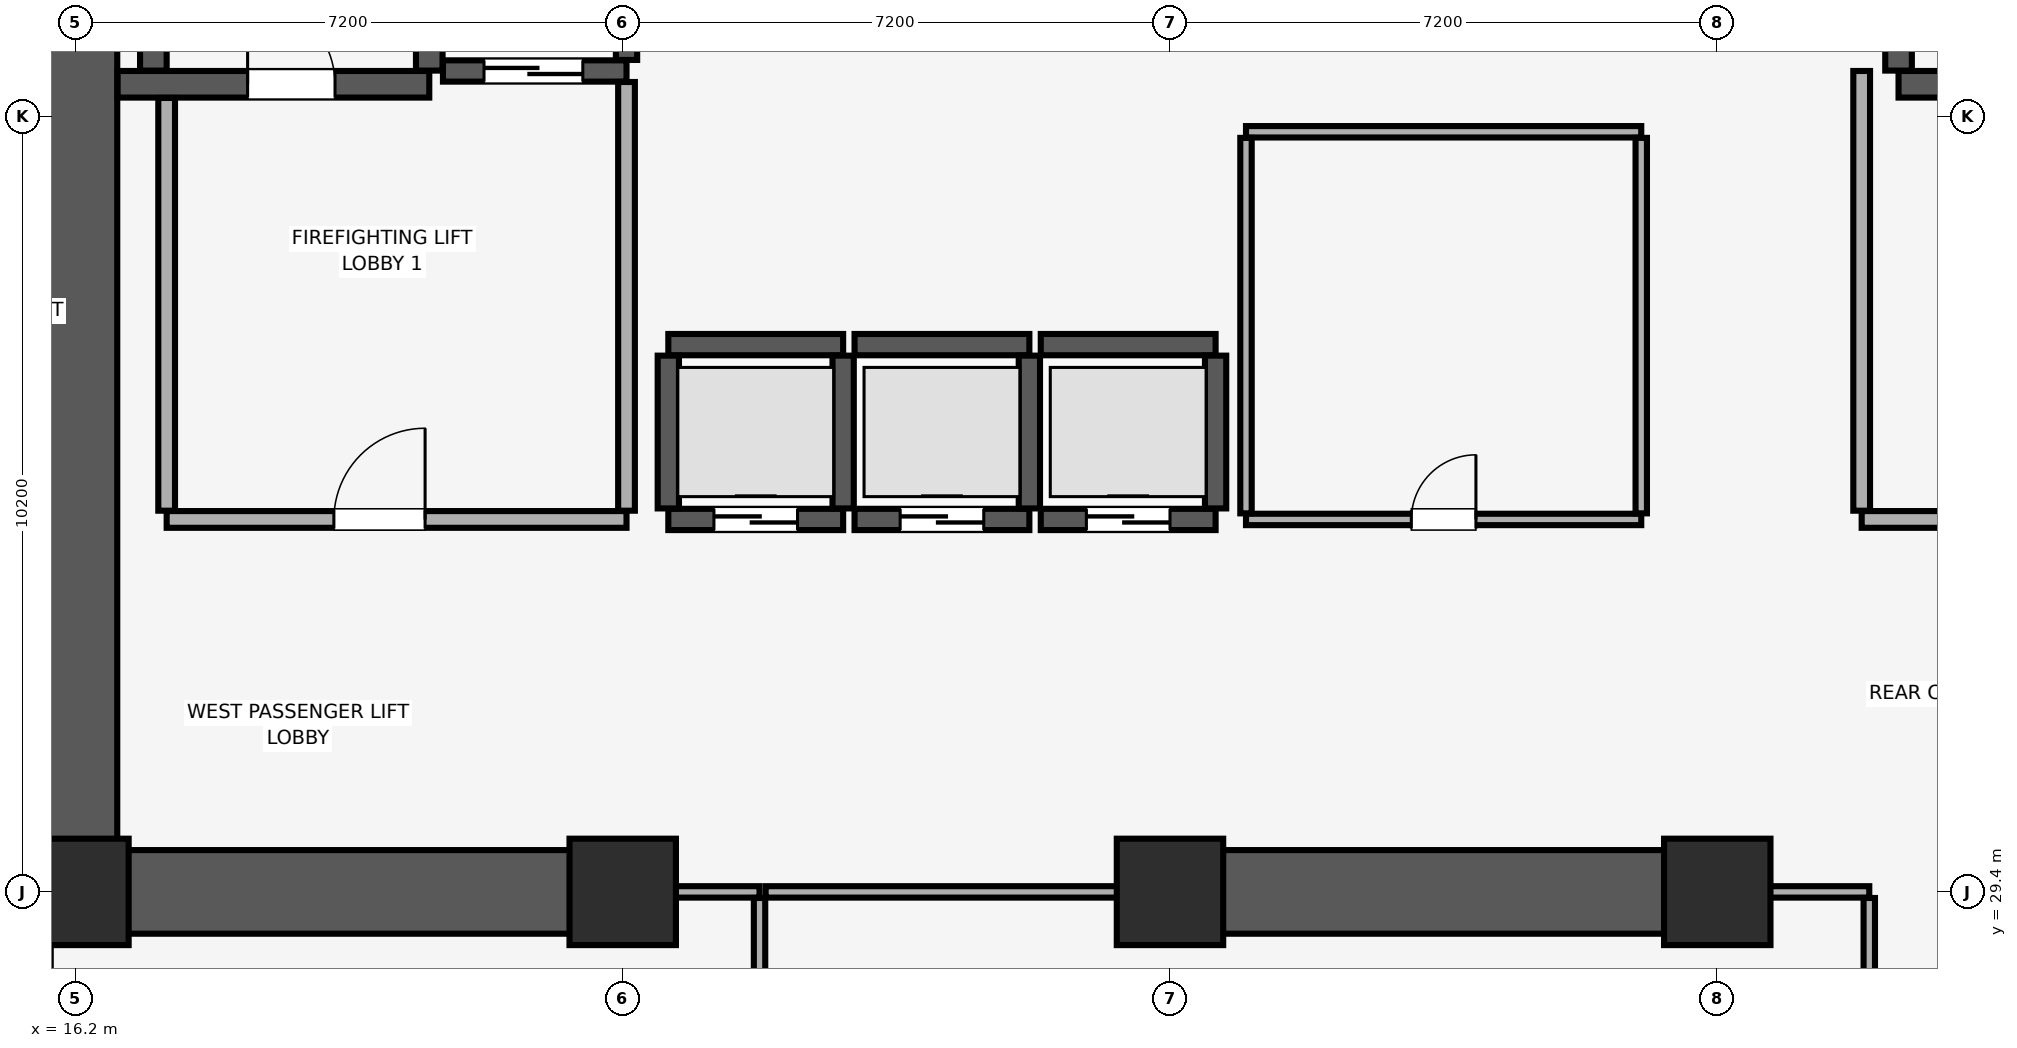
"""IFC4 building model, lengths in metres.
Left out: names, types, materials, properties, quantities, classifications, styles, units other than length and angle.
Written with IfcOpenShell. Run it as: python <this file> out.ifc"""

import sys

from ifc_helpers import new_model, si_unit, direction, frame, frame_2d, origin, origin_2d, place, context, subcontext, project, spatial, rectangle, extrude, element, fill, save


model = new_model("IFC4")
c1 = context("Model", 3, precision=1e-05, world=origin(), true_north=direction((0.0, 1.0)))
c2 = subcontext(c1, "Body", "Model", "MODEL_VIEW")
j1 = project(units=[si_unit("LENGTHUNIT", "METRE"), si_unit("PLANEANGLEUNIT", "RADIAN")], contexts=[c1])
p1 = place(None, origin())
s1 = spatial("IfcSite", under=j1, at=p1, CompositionType="ELEMENT")
p2 = place(p1, origin())
s2 = spatial("IfcBuilding", under=s1, at=p2, CompositionType="ELEMENT")
p3 = place(p2, frame((0.0, 0.0, 72.65)))
s3 = spatial("IfcBuildingStorey", under=s2, at=p3, CompositionType="ELEMENT", Elevation=72.65)
for number, where, z_axis, x_axis in (
    (1, (16.2, 29.4, 0.0), (0.0, 0.0, 1.0), (1.0, 0.0, 0.0)),
    (2, (23.4, 29.4, 0.0), (0.0, 0.0, 1.0), (1.0, 0.0, 0.0)),
    (3, (30.6, 29.4, 0.0), (0.0, 0.0, 1.0), (1.0, 0.0, 0.0)),
    (4, (37.8, 29.4, 0.0), (0.0, 0.0, 1.0), (1.0, 0.0, 0.0)),
):
    element("IfcColumn", number, at=place(p3, frame(where, z_axis=z_axis, x_axis=x_axis)), inside=s3, PredefinedType="COLUMN", context=c2, shape_type="SweptSolid", body=[
        extrude(rectangle(XDim=1.4, YDim=1.4, at=origin_2d()), origin(), (0.0, 0.0, 1.0), 3.51),
    ])
p4 = place(p3, frame((16.2, 29.4, 0.0), z_axis=(0.0, 0.0, 1.0), x_axis=(0.0, 1.0, 0.0)))
e5 = element("IfcWall", 5, at=p4, inside=s3, PredefinedType="SHEAR", context=c2, shape_type="SweptSolid", body=[
    extrude(rectangle(XDim=19.2, YDim=1.1, at=frame_2d((9.6, 0.0))), origin(), (0.0, 0.0, 1.0), 3.51),
])
p5 = place(p3, frame((16.755, 29.4, 0.0), z_axis=(0.0, 0.0, 1.0), x_axis=(1.0, 0.0, 0.0)))
e6 = element("IfcWall", 6, at=p5, inside=s3, PredefinedType="SHEAR", context=c2, shape_type="SweptSolid", body=[
    extrude(rectangle(XDim=6.845, YDim=1.1, at=frame_2d((3.423, 0.0))), origin(), (0.0, 0.0, 1.0), 3.51),
])
p6 = place(p3, frame((30.4, 29.4, 0.0), z_axis=(0.0, 0.0, 1.0), x_axis=(1.0, 0.0, 0.0)))
e7 = element("IfcWall", 7, at=p6, inside=s3, PredefinedType="SHEAR", context=c2, shape_type="SweptSolid", body=[
    extrude(rectangle(XDim=7.6, YDim=1.1, at=frame_2d((3.8, 0.0))), origin(), (0.0, 0.0, 1.0), 3.51),
])
p7 = place(p3, frame((16.755, 40.025, 0.0), z_axis=(0.0, 0.0, 1.0), x_axis=(1.0, 0.0, 0.0)))
e8 = element("IfcWall", 8, at=p7, inside=s3, PredefinedType="SHEAR", context=c2, shape_type="SweptSolid", body=[
    extrude(rectangle(XDim=4.1, YDim=0.35, at=frame_2d((2.05, 0.0))), origin(), (0.0, 0.0, 1.0), 3.51),
])
p8 = place(p7, frame((1.71, 0.0, 0.0)))
e9 = element("IfcOpeningElement", 9, at=p8, cuts=e8, PredefinedType="OPENING", context=c2, shape_type="SweptSolid", body=[
    extrude(rectangle(XDim=1.15, YDim=2.15, at=frame_2d((0.575, 1.075))), frame((0.0, 0.185, 0.0), z_axis=(0.0, -1.0, 0.0), x_axis=(1.0, 0.0, 0.0)), (0.0, 0.0, 1.0), 0.37),
])
for number, where, z_axis, x_axis in (
    (10, (17.225, 40.205, 0.0), (0.0, 0.0, 1.0), (0.0, 1.0, 0.0)),
    (11, (20.855, 40.205, 0.0), (0.0, 0.0, 1.0), (0.0, 1.0, 0.0)),
):
    element("IfcWall", number, at=place(p3, frame(where, z_axis=z_axis, x_axis=x_axis)), inside=s3, PredefinedType="SHEAR", context=c2, shape_type="SweptSolid", body=[
        extrude(rectangle(XDim=8.09, YDim=0.35, at=frame_2d((4.045, 0.0))), origin(), (0.0, 0.0, 1.0), 3.51),
    ])
p9 = place(p3, frame((40.185, 40.025, 0.0), z_axis=(0.0, 0.0, 1.0), x_axis=(1.0, 0.0, 0.0)))
e12 = element("IfcWall", 12, at=p9, inside=s3, PredefinedType="SHEAR", context=c2, shape_type="SweptSolid", body=[
    extrude(rectangle(XDim=3.63, YDim=0.35, at=frame_2d((1.815, 0.0))), origin(), (0.0, 0.0, 1.0), 3.51),
])
p10 = place(p9, frame((1.24, 0.0, 0.0)))
e13 = element("IfcOpeningElement", 13, at=p10, cuts=e12, PredefinedType="OPENING", context=c2, shape_type="SweptSolid", body=[
    extrude(rectangle(XDim=1.15, YDim=2.15, at=frame_2d((0.575, 1.075))), frame((0.0, 0.185, 0.0), z_axis=(0.0, -1.0, 0.0), x_axis=(1.0, 0.0, 0.0)), (0.0, 0.0, 1.0), 0.37),
])
p11 = place(p3, frame((40.185, 40.205, 0.0), z_axis=(0.0, 0.0, 1.0), x_axis=(0.0, 1.0, 0.0)))
e14 = element("IfcWall", 14, at=p11, inside=s3, PredefinedType="SHEAR", context=c2, shape_type="SweptSolid", body=[
    extrude(rectangle(XDim=8.09, YDim=0.35, at=frame_2d((4.045, 0.0))), origin(), (0.0, 0.0, 1.0), 3.51),
])
p12 = place(p3, frame((24.0, 34.3, 0.0), z_axis=(0.0, 0.0, 1.0), x_axis=(1.0, 0.0, 0.0)))
e15 = element("IfcWall", 15, at=p12, inside=s3, PredefinedType="SHEAR", context=c2, shape_type="SweptSolid", body=[
    extrude(rectangle(XDim=2.3, YDim=0.28, at=frame_2d((1.15, 0.0))), origin(), (0.0, 0.0, 1.0), 3.51),
])
p13 = place(p12, frame((0.6, 0.0, 0.0)))
e16 = element("IfcOpeningElement", 16, at=p13, cuts=e15, PredefinedType="OPENING", context=c2, shape_type="SweptSolid", body=[
    extrude(rectangle(XDim=1.1, YDim=2.2, at=frame_2d((0.55, 1.1))), frame((0.0, 0.15, 0.0), z_axis=(0.0, -1.0, 0.0), x_axis=(1.0, 0.0, 0.0)), (0.0, 0.0, 1.0), 0.3),
])
p14 = place(p3, frame((24.0, 36.6, 0.0), z_axis=(0.0, 0.0, 1.0), x_axis=(1.0, 0.0, 0.0)))
e17 = element("IfcWall", 17, at=p14, inside=s3, PredefinedType="SHEAR", context=c2, shape_type="SweptSolid", body=[
    extrude(rectangle(XDim=2.3, YDim=0.28, at=frame_2d((1.15, 0.0))), origin(), (0.0, 0.0, 1.0), 3.51),
])
for number, where, z_axis, x_axis in (
    (18, (24.0, 34.445, 0.0), (0.0, 0.0, 1.0), (0.0, 1.0, 0.0)),
    (19, (26.3, 34.445, 0.0), (0.0, 0.0, 1.0), (0.0, 1.0, 0.0)),
):
    element("IfcWall", number, at=place(p3, frame(where, z_axis=z_axis, x_axis=x_axis)), inside=s3, PredefinedType="SHEAR", context=c2, shape_type="SweptSolid", body=[
        extrude(rectangle(XDim=2.01, YDim=0.28, at=frame_2d((1.005, 0.0))), origin(), (0.0, 0.0, 1.0), 3.51),
    ])
p15 = place(p3, frame((26.45, 34.3, 0.0), z_axis=(0.0, 0.0, 1.0), x_axis=(1.0, 0.0, 0.0)))
e20 = element("IfcWall", 20, at=p15, inside=s3, PredefinedType="SHEAR", context=c2, shape_type="SweptSolid", body=[
    extrude(rectangle(XDim=2.3, YDim=0.28, at=frame_2d((1.15, 0.0))), origin(), (0.0, 0.0, 1.0), 3.51),
])
p16 = place(p15, frame((0.6, 0.0, 0.0)))
e21 = element("IfcOpeningElement", 21, at=p16, cuts=e20, PredefinedType="OPENING", context=c2, shape_type="SweptSolid", body=[
    extrude(rectangle(XDim=1.1, YDim=2.2, at=frame_2d((0.55, 1.1))), frame((0.0, 0.15, 0.0), z_axis=(0.0, -1.0, 0.0), x_axis=(1.0, 0.0, 0.0)), (0.0, 0.0, 1.0), 0.3),
])
p17 = place(p3, frame((26.45, 36.6, 0.0), z_axis=(0.0, 0.0, 1.0), x_axis=(1.0, 0.0, 0.0)))
e22 = element("IfcWall", 22, at=p17, inside=s3, PredefinedType="SHEAR", context=c2, shape_type="SweptSolid", body=[
    extrude(rectangle(XDim=2.3, YDim=0.28, at=frame_2d((1.15, 0.0))), origin(), (0.0, 0.0, 1.0), 3.51),
])
p18 = place(p3, frame((28.75, 34.445, 0.0), z_axis=(0.0, 0.0, 1.0), x_axis=(0.0, 1.0, 0.0)))
e23 = element("IfcWall", 23, at=p18, inside=s3, PredefinedType="SHEAR", context=c2, shape_type="SweptSolid", body=[
    extrude(rectangle(XDim=2.01, YDim=0.28, at=frame_2d((1.005, 0.0))), origin(), (0.0, 0.0, 1.0), 3.51),
])
p19 = place(p3, frame((28.9, 34.3, 0.0), z_axis=(0.0, 0.0, 1.0), x_axis=(1.0, 0.0, 0.0)))
e24 = element("IfcWall", 24, at=p19, inside=s3, PredefinedType="SHEAR", context=c2, shape_type="SweptSolid", body=[
    extrude(rectangle(XDim=2.3, YDim=0.28, at=frame_2d((1.15, 0.0))), origin(), (0.0, 0.0, 1.0), 3.51),
])
p20 = place(p19, frame((0.6, 0.0, 0.0)))
e25 = element("IfcOpeningElement", 25, at=p20, cuts=e24, PredefinedType="OPENING", context=c2, shape_type="SweptSolid", body=[
    extrude(rectangle(XDim=1.1, YDim=2.2, at=frame_2d((0.55, 1.1))), frame((0.0, 0.15, 0.0), z_axis=(0.0, -1.0, 0.0), x_axis=(1.0, 0.0, 0.0)), (0.0, 0.0, 1.0), 0.3),
])
p21 = place(p3, frame((28.9, 36.6, 0.0), z_axis=(0.0, 0.0, 1.0), x_axis=(1.0, 0.0, 0.0)))
e26 = element("IfcWall", 26, at=p21, inside=s3, PredefinedType="SHEAR", context=c2, shape_type="SweptSolid", body=[
    extrude(rectangle(XDim=2.3, YDim=0.28, at=frame_2d((1.15, 0.0))), origin(), (0.0, 0.0, 1.0), 3.51),
])
p22 = place(p3, frame((31.2, 34.445, 0.0), z_axis=(0.0, 0.0, 1.0), x_axis=(0.0, 1.0, 0.0)))
e27 = element("IfcWall", 27, at=p22, inside=s3, PredefinedType="SHEAR", context=c2, shape_type="SweptSolid", body=[
    extrude(rectangle(XDim=2.01, YDim=0.28, at=frame_2d((1.005, 0.0))), origin(), (0.0, 0.0, 1.0), 3.51),
])
p23 = place(p3, frame((21.035, 40.2, 0.0), z_axis=(0.0, 0.0, 1.0), x_axis=(1.0, 0.0, 0.0)))
e28 = element("IfcWall", 28, at=p23, inside=s3, PredefinedType="SHEAR", context=c2, shape_type="SweptSolid", body=[
    extrude(rectangle(XDim=2.415, YDim=0.28, at=frame_2d((1.208, 0.0))), origin(), (0.0, 0.0, 1.0), 3.51),
])
p24 = place(p23, frame((0.54, 0.0, 0.0)))
e29 = element("IfcOpeningElement", 29, at=p24, cuts=e28, PredefinedType="OPENING", context=c2, shape_type="SweptSolid", body=[
    extrude(rectangle(XDim=1.3, YDim=2.3, at=frame_2d((0.65, 1.15))), frame((0.0, 0.15, 0.0), z_axis=(0.0, -1.0, 0.0), x_axis=(1.0, 0.0, 0.0)), (0.0, 0.0, 1.0), 0.3),
])
p25 = place(p3, frame((23.45, 40.345, 0.0), z_axis=(0.0, 0.0, 1.0), x_axis=(0.0, 1.0, 0.0)))
e30 = element("IfcWall", 30, at=p25, inside=s3, PredefinedType="SHEAR", context=c2, shape_type="SweptSolid", body=[
    extrude(rectangle(XDim=2.81, YDim=0.28, at=frame_2d((1.405, 0.0))), origin(), (0.0, 0.0, 1.0), 3.51),
])
p26 = place(p3, frame((17.4, 34.3, 0.0), z_axis=(0.0, 0.0, 1.0), x_axis=(1.0, 0.0, 0.0)))
e31 = element("IfcWall", 31, at=p26, inside=s3, PredefinedType="PARTITIONING", context=c2, shape_type="SweptSolid", body=[
    extrude(rectangle(XDim=6.05, YDim=0.22, at=frame_2d((3.025, 0.0))), origin(), (0.0, 0.0, 1.0), 3.51),
])
p27 = place(p26, frame((2.2, 0.0, 0.0)))
e32 = element("IfcOpeningElement", 32, at=p27, cuts=e31, PredefinedType="OPENING", context=c2, shape_type="SweptSolid", body=[
    extrude(rectangle(XDim=1.2, YDim=2.15, at=frame_2d((0.6, 1.075))), frame((0.0, 0.12, 0.0), z_axis=(0.0, -1.0, 0.0), x_axis=(1.0, 0.0, 0.0)), (0.0, 0.0, 1.0), 0.24),
])
p28 = place(p3, frame((17.4, 34.415, 0.0), z_axis=(0.0, 0.0, 1.0), x_axis=(0.0, 1.0, 0.0)))
e33 = element("IfcWall", 33, at=p28, inside=s3, PredefinedType="PARTITIONING", context=c2, shape_type="SweptSolid", body=[
    extrude(rectangle(XDim=5.43, YDim=0.22, at=frame_2d((2.715, 0.0))), origin(), (0.0, 0.0, 1.0), 3.51),
])
p29 = place(p3, frame((23.45, 34.415, 0.0), z_axis=(0.0, 0.0, 1.0), x_axis=(0.0, 1.0, 0.0)))
e34 = element("IfcWall", 34, at=p29, inside=s3, PredefinedType="PARTITIONING", context=c2, shape_type="SweptSolid", body=[
    extrude(rectangle(XDim=5.64, YDim=0.22, at=frame_2d((2.82, 0.0))), origin(), (0.0, 0.0, 1.0), 3.51),
])
p30 = place(p3, frame((39.7, 34.3, 0.0), z_axis=(0.0, 0.0, 1.0), x_axis=(1.0, 0.0, 0.0)))
e35 = element("IfcWall", 35, at=p30, inside=s3, PredefinedType="PARTITIONING", context=c2, shape_type="SweptSolid", body=[
    extrude(rectangle(XDim=4.6, YDim=0.22, at=frame_2d((2.3, 0.0))), origin(), (0.0, 0.0, 1.0), 3.51),
])
p31 = place(p30, frame((1.7, 0.0, 0.0)))
e36 = element("IfcOpeningElement", 36, at=p31, cuts=e35, PredefinedType="OPENING", context=c2, shape_type="SweptSolid", body=[
    extrude(rectangle(XDim=1.2, YDim=2.15, at=frame_2d((0.6, 1.075))), frame((0.0, 0.12, 0.0), z_axis=(0.0, -1.0, 0.0), x_axis=(1.0, 0.0, 0.0)), (0.0, 0.0, 1.0), 0.24),
])
p32 = place(p3, frame((39.7, 34.415, 0.0), z_axis=(0.0, 0.0, 1.0), x_axis=(0.0, 1.0, 0.0)))
e37 = element("IfcWall", 37, at=p32, inside=s3, PredefinedType="PARTITIONING", context=c2, shape_type="SweptSolid", body=[
    extrude(rectangle(XDim=5.785, YDim=0.22, at=frame_2d((2.893, 0.0))), origin(), (0.0, 0.0, 1.0), 3.51),
])
p33 = place(p3, frame((31.6, 34.3, 0.0), z_axis=(0.0, 0.0, 1.0), x_axis=(1.0, 0.0, 0.0)))
e38 = element("IfcWall", 38, at=p33, inside=s3, PredefinedType="PARTITIONING", context=c2, shape_type="SweptSolid", body=[
    extrude(rectangle(XDim=5.2, YDim=0.15, at=frame_2d((2.6, 0.0))), origin(), (0.0, 0.0, 1.0), 3.51),
])
p34 = place(p33, frame((2.175, 0.0, 0.0)))
e39 = element("IfcOpeningElement", 39, at=p34, cuts=e38, PredefinedType="OPENING", context=c2, shape_type="SweptSolid", body=[
    extrude(rectangle(XDim=0.85, YDim=2.1, at=frame_2d((0.425, 1.05))), frame((0.0, 0.085, 0.0), z_axis=(0.0, -1.0, 0.0), x_axis=(1.0, 0.0, 0.0)), (0.0, 0.0, 1.0), 0.17),
])
p35 = place(p3, frame((31.6, 39.4, 0.0), z_axis=(0.0, 0.0, 1.0), x_axis=(1.0, 0.0, 0.0)))
e40 = element("IfcWall", 40, at=p35, inside=s3, PredefinedType="PARTITIONING", context=c2, shape_type="SweptSolid", body=[
    extrude(rectangle(XDim=5.2, YDim=0.15, at=frame_2d((2.6, 0.0))), origin(), (0.0, 0.0, 1.0), 3.51),
])
for number, where, z_axis, x_axis in (
    (41, (31.6, 34.38, 0.0), (0.0, 0.0, 1.0), (0.0, 1.0, 0.0)),
    (42, (36.8, 34.38, 0.0), (0.0, 0.0, 1.0), (0.0, 1.0, 0.0)),
):
    element("IfcWall", number, at=place(p3, frame(where, z_axis=z_axis, x_axis=x_axis)), inside=s3, PredefinedType="PARTITIONING", context=c2, shape_type="SweptSolid", body=[
        extrude(rectangle(XDim=4.94, YDim=0.15, at=frame_2d((2.47, 0.0))), origin(), (0.0, 0.0, 1.0), 3.51),
    ])
p36 = place(p3, frame((23.61, 29.4, 0.0), z_axis=(0.0, 0.0, 1.0), x_axis=(1.0, 0.0, 0.0)))
e43 = element("IfcWall", 43, at=p36, inside=s3, PredefinedType="PARTITIONING", context=c2, shape_type="SweptSolid", body=[
    extrude(rectangle(XDim=1.59, YDim=0.15, at=frame_2d((0.795, 0.0))), origin(), (0.0, 0.0, 1.0), 2.41),
])
p37 = place(p3, frame((25.2, 21.13, 0.0), z_axis=(0.0, 0.0, 1.0), x_axis=(0.0, 1.0, 0.0)))
e44 = element("IfcWall", 44, at=p37, inside=s3, PredefinedType="PARTITIONING", context=c2, shape_type="SweptSolid", body=[
    extrude(rectangle(XDim=8.19, YDim=0.15, at=frame_2d((4.095, 0.0))), origin(), (0.0, 0.0, 1.0), 3.51),
])
p38 = place(p3, frame((25.28, 29.4, 0.0), z_axis=(0.0, 0.0, 1.0), x_axis=(1.0, 0.0, 0.0)))
e45 = element("IfcWall", 45, at=p38, inside=s3, PredefinedType="PARTITIONING", context=c2, shape_type="SweptSolid", body=[
    extrude(rectangle(XDim=5.11, YDim=0.15, at=frame_2d((2.555, 0.0))), origin(), (0.0, 0.0, 1.0), 2.41),
])
p39 = place(p3, frame((38.01, 29.4, 0.0), z_axis=(0.0, 0.0, 1.0), x_axis=(1.0, 0.0, 0.0)))
e46 = element("IfcWall", 46, at=p39, inside=s3, PredefinedType="PARTITIONING", context=c2, shape_type="SweptSolid", body=[
    extrude(rectangle(XDim=1.79, YDim=0.15, at=frame_2d((0.895, 0.0))), origin(), (0.0, 0.0, 1.0), 2.41),
])
p40 = place(p3, frame((39.8, 21.13, 0.0), z_axis=(0.0, 0.0, 1.0), x_axis=(0.0, 1.0, 0.0)))
e47 = element("IfcWall", 47, at=p40, inside=s3, PredefinedType="PARTITIONING", context=c2, shape_type="SweptSolid", body=[
    extrude(rectangle(XDim=8.19, YDim=0.15, at=frame_2d((4.095, 0.0))), origin(), (0.0, 0.0, 1.0), 3.51),
])
p41 = place(p8, origin())
e48 = element("IfcDoor", 48, at=p41, inside=s3, OperationType="SINGLE_SWING_LEFT", PredefinedType="DOOR", context=c2, shape_type="SweptSolid", body=[
    extrude(rectangle(XDim=1.15, YDim=2.15, at=frame_2d((0.575, 1.075))), frame((0.0, 0.025, 0.0), z_axis=(0.0, -1.0, 0.0), x_axis=(1.0, 0.0, 0.0)), (0.0, 0.0, 1.0), 0.05),
])
fill(e9, e48)
p42 = place(p13, origin())
e49 = element("IfcDoor", 49, at=p42, inside=s3, OperationType="DOUBLE_DOOR_SLIDING", PredefinedType="DOOR", context=c2, shape_type="SweptSolid", body=[
    extrude(rectangle(XDim=1.1, YDim=2.2, at=frame_2d((0.55, 1.1))), frame((0.0, 0.025, 0.0), z_axis=(0.0, -1.0, 0.0), x_axis=(1.0, 0.0, 0.0)), (0.0, 0.0, 1.0), 0.05),
])
fill(e16, e49)
p43 = place(p16, origin())
e50 = element("IfcDoor", 50, at=p43, inside=s3, OperationType="DOUBLE_DOOR_SLIDING", PredefinedType="DOOR", context=c2, shape_type="SweptSolid", body=[
    extrude(rectangle(XDim=1.1, YDim=2.2, at=frame_2d((0.55, 1.1))), frame((0.0, 0.025, 0.0), z_axis=(0.0, -1.0, 0.0), x_axis=(1.0, 0.0, 0.0)), (0.0, 0.0, 1.0), 0.05),
])
fill(e21, e50)
p44 = place(p20, origin())
e51 = element("IfcDoor", 51, at=p44, inside=s3, OperationType="DOUBLE_DOOR_SLIDING", PredefinedType="DOOR", context=c2, shape_type="SweptSolid", body=[
    extrude(rectangle(XDim=1.1, YDim=2.2, at=frame_2d((0.55, 1.1))), frame((0.0, 0.025, 0.0), z_axis=(0.0, -1.0, 0.0), x_axis=(1.0, 0.0, 0.0)), (0.0, 0.0, 1.0), 0.05),
])
fill(e25, e51)
p45 = place(p24, origin())
e52 = element("IfcDoor", 52, at=p45, inside=s3, OperationType="DOUBLE_DOOR_SLIDING", PredefinedType="DOOR", context=c2, shape_type="SweptSolid", body=[
    extrude(rectangle(XDim=1.3, YDim=2.3, at=frame_2d((0.65, 1.15))), frame((0.0, 0.025, 0.0), z_axis=(0.0, -1.0, 0.0), x_axis=(1.0, 0.0, 0.0)), (0.0, 0.0, 1.0), 0.05),
])
fill(e29, e52)
p46 = place(p27, origin())
e53 = element("IfcDoor", 53, at=p46, inside=s3, OperationType="SINGLE_SWING_RIGHT", PredefinedType="DOOR", context=c2, shape_type="SweptSolid", body=[
    extrude(rectangle(XDim=1.2, YDim=2.15, at=frame_2d((0.6, 1.075))), frame((0.0, 0.025, 0.0), z_axis=(0.0, -1.0, 0.0), x_axis=(1.0, 0.0, 0.0)), (0.0, 0.0, 1.0), 0.05),
])
fill(e32, e53)
p47 = place(p34, origin())
e54 = element("IfcDoor", 54, at=p47, inside=s3, OperationType="SINGLE_SWING_RIGHT", PredefinedType="DOOR", context=c2, shape_type="SweptSolid", body=[
    extrude(rectangle(XDim=0.85, YDim=2.1, at=frame_2d((0.425, 1.05))), frame((0.0, 0.025, 0.0), z_axis=(0.0, -1.0, 0.0), x_axis=(1.0, 0.0, 0.0)), (0.0, 0.0, 1.0), 0.05),
])
fill(e39, e54)
save(model, sys.argv[1])
